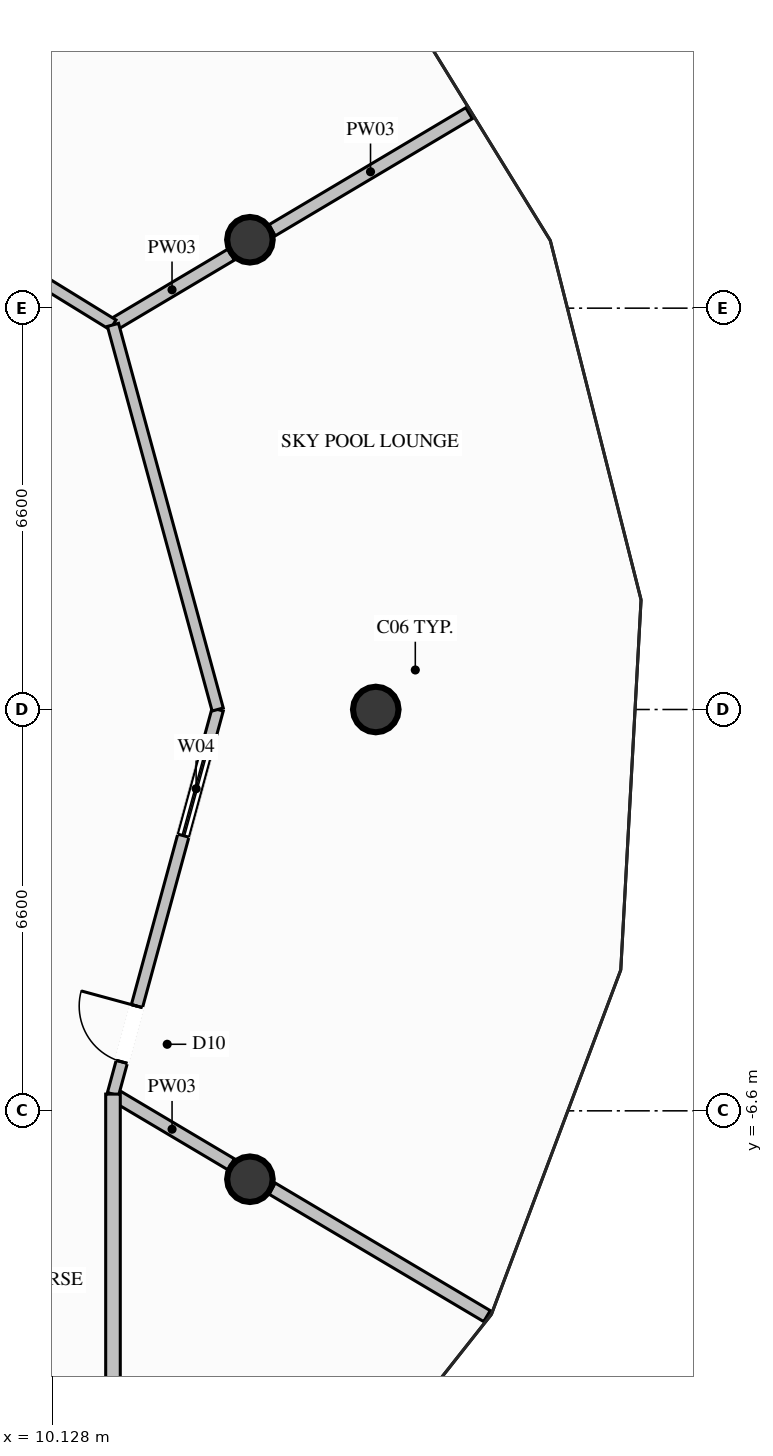
"""IFC4 building model, lengths in metres.
Left out: names, types, materials, properties, quantities, classifications, styles, units other than length and angle.
Written with IfcOpenShell. Run it as: python <this file> out.ifc"""

import sys

from ifc_helpers import new_model, si_unit, direction, frame, frame_2d, origin, origin_2d, place, context, subcontext, project, spatial, rectangle, circle, extrude, element, fill, save


model = new_model("IFC4")
c1 = context("Model", 3, precision=1e-05, world=origin(), true_north=direction((0.0, 1.0)))
c2 = subcontext(c1, "Body", "Model", "MODEL_VIEW")
j1 = project(units=[si_unit("LENGTHUNIT", "METRE"), si_unit("PLANEANGLEUNIT", "RADIAN")], contexts=[c1])
p1 = place(None, origin())
s1 = spatial("IfcSite", under=j1, at=p1, CompositionType="ELEMENT")
p2 = place(p1, origin())
s2 = spatial("IfcBuilding", under=s1, at=p2, CompositionType="ELEMENT")
p3 = place(p2, frame((0.0, 0.0, 262.0)))
s3 = spatial("IfcBuildingStorey", under=s2, at=p3, CompositionType="ELEMENT", Elevation=262.0)
for number, where, z_axis, x_axis in (
    (1, (15.45, 0.0, 0.0), (0.0, 0.0, 1.0), (1.0, 0.0, 0.0)),
    (2, (13.38, 7.725, 0.0), (0.0, 0.0, 1.0), (1.0, 0.0, 0.0)),
    (3, (13.38, -7.725, 0.0), (0.0, 0.0, 1.0), (1.0, 0.0, 0.0)),
):
    element("IfcColumn", number, at=place(p3, frame(where, z_axis=z_axis, x_axis=x_axis)), inside=s3, PredefinedType="COLUMN", context=c2, shape_type="SweptSolid", body=[
        extrude(circle(Radius=0.375, at=origin_2d()), origin(), (0.0, 0.0, 1.0), 4.8),
    ])
p4 = place(p3, frame((11.128, 6.325, 0.0), z_axis=(0.0, 0.0, 1.0), x_axis=(0.859488422008, 0.511155213642, 0.0)))
e4 = element("IfcWall", 4, at=p4, inside=s3, PredefinedType="PARTITIONING", context=c2, shape_type="SweptSolid", body=[
    extrude(rectangle(XDim=2.26, YDim=0.21, at=frame_2d((1.13, 0.0))), origin(), (0.0, 0.0, 1.0), 4.011),
])
p5 = place(p3, frame((13.743, 7.88, 0.0), z_axis=(0.0, 0.0, 1.0), x_axis=(0.859656572413, 0.510872369097, 0.0)))
e5 = element("IfcWall", 5, at=p5, inside=s3, PredefinedType="PARTITIONING", context=c2, shape_type="SweptSolid", body=[
    extrude(rectangle(XDim=3.77, YDim=0.21, at=frame_2d((1.885, 0.0))), origin(), (0.0, 0.0, 1.0), 4.57),
])
p6 = place(p3, frame((11.128, -6.325, 0.0), z_axis=(0.0, 0.0, 1.0), x_axis=(0.859791012607, -0.510646075712, 0.0)))
e6 = element("IfcWall", 6, at=p6, inside=s3, PredefinedType="PARTITIONING", context=c2, shape_type="SweptSolid", body=[
    extrude(rectangle(XDim=2.26, YDim=0.21, at=frame_2d((1.13, 0.0))), origin(), (0.0, 0.0, 1.0), 4.011),
])
p7 = place(p3, frame((13.744, -7.878, 0.0), z_axis=(0.0, 0.0, 1.0), x_axis=(0.859945978339, -0.510385064768, 0.0)))
e7 = element("IfcWall", 7, at=p7, inside=s3, PredefinedType="PARTITIONING", context=c2, shape_type="SweptSolid", body=[
    extrude(rectangle(XDim=4.111, YDim=0.21, at=frame_2d((2.055, 0.0))), origin(), (0.0, 0.0, 1.0), 4.57),
])
p8 = place(p3, frame((7.35, 8.65, 0.0), z_axis=(0.0, 0.0, 1.0), x_axis=(0.851645088617, -0.524118920699, 0.0)))
e8 = element("IfcWall", 8, at=p8, inside=s3, PredefinedType="PARTITIONING", context=c2, shape_type="SweptSolid", body=[
    extrude(rectangle(XDim=4.436, YDim=0.19, at=frame_2d((2.218, 0.0))), origin(), (0.0, 0.0, 1.0), 4.57),
])
p9 = place(p8, frame((1.743, 0.0, 0.0)))
e9 = element("IfcOpeningElement", 9, at=p9, cuts=e8, PredefinedType="OPENING", context=c2, shape_type="SweptSolid", body=[
    extrude(rectangle(XDim=0.95, YDim=2.1, at=frame_2d((0.475, 1.05))), frame((0.0, 0.105, 0.0), z_axis=(0.0, -1.0, 0.0), x_axis=(1.0, 0.0, 0.0)), (0.0, 0.0, 1.0), 0.21),
])
p10 = place(p3, frame((11.128, -6.325, 0.0), z_axis=(0.0, 0.0, 1.0), x_axis=(0.262717156474, 0.964872890952, 0.0)))
e10 = element("IfcWall", 10, at=p10, inside=s3, PredefinedType="PARTITIONING", context=c2, shape_type="SweptSolid", body=[
    extrude(rectangle(XDim=6.555, YDim=0.19, at=frame_2d((3.278, 0.0))), origin(), (0.0, 0.0, 1.0), 4.57),
])
p11 = place(p10, frame((0.55, 0.0, 0.0)))
e11 = element("IfcOpeningElement", 11, at=p11, cuts=e10, PredefinedType="OPENING", context=c2, shape_type="SweptSolid", body=[
    extrude(rectangle(XDim=0.95, YDim=2.1, at=frame_2d((0.475, 1.05))), frame((0.0, 0.105, 0.0), z_axis=(0.0, -1.0, 0.0), x_axis=(1.0, 0.0, 0.0)), (0.0, 0.0, 1.0), 0.21),
])
p12 = place(p10, frame((4.405, 0.0, 0.9)))
e12 = element("IfcOpeningElement", 12, at=p12, cuts=e10, PredefinedType="OPENING", context=c2, shape_type="SweptSolid", body=[
    extrude(rectangle(XDim=1.6, YDim=1.4, at=frame_2d((0.8, 0.7))), frame((0.0, 0.105, 0.0), z_axis=(0.0, -1.0, 0.0), x_axis=(1.0, 0.0, 0.0)), (0.0, 0.0, 1.0), 0.21),
])
p13 = place(p3, frame((12.85, 0.0, 0.0), z_axis=(0.0, 0.0, 1.0), x_axis=(-0.262717156474, 0.964872890952, 0.0)))
e13 = element("IfcWall", 13, at=p13, inside=s3, PredefinedType="PARTITIONING", context=c2, shape_type="SweptSolid", body=[
    extrude(rectangle(XDim=6.555, YDim=0.19, at=frame_2d((3.278, 0.0))), origin(), (0.0, 0.0, 1.0), 4.57),
])
p14 = place(p3, frame((11.128, -11.8, 0.0), z_axis=(0.0, 0.0, 1.0), x_axis=(0.0, 1.0, 0.0)))
e14 = element("IfcWall", 14, at=p14, inside=s3, PredefinedType="PARTITIONING", context=c2, shape_type="SweptSolid", body=[
    extrude(rectangle(XDim=5.475, YDim=0.24, at=frame_2d((2.738, 0.0))), origin(), (0.0, 0.0, 1.0), 4.57),
])
p15 = place(p11, origin())
e15 = element("IfcDoor", 15, at=p15, inside=s3, OperationType="SINGLE_SWING_RIGHT", PredefinedType="DOOR", context=c2, shape_type="SweptSolid", body=[
    extrude(rectangle(XDim=0.95, YDim=2.1, at=frame_2d((0.475, 1.05))), frame((0.0, 0.025, 0.0), z_axis=(0.0, -1.0, 0.0), x_axis=(1.0, 0.0, 0.0)), (0.0, 0.0, 1.0), 0.05),
])
fill(e11, e15)
p16 = place(p12, origin())
e16 = element("IfcWindow", 16, at=p16, inside=s3, PartitioningType="SINGLE_PANEL", PredefinedType="WINDOW", context=c2, shape_type="SweptSolid", body=[
    extrude(rectangle(XDim=1.6, YDim=1.4, at=frame_2d((0.8, 0.7))), frame((0.0, 0.03, 0.0), z_axis=(0.0, -1.0, 0.0), x_axis=(1.0, 0.0, 0.0)), (0.0, 0.0, 1.0), 0.06),
])
fill(e12, e16)
save(model, sys.argv[1])
